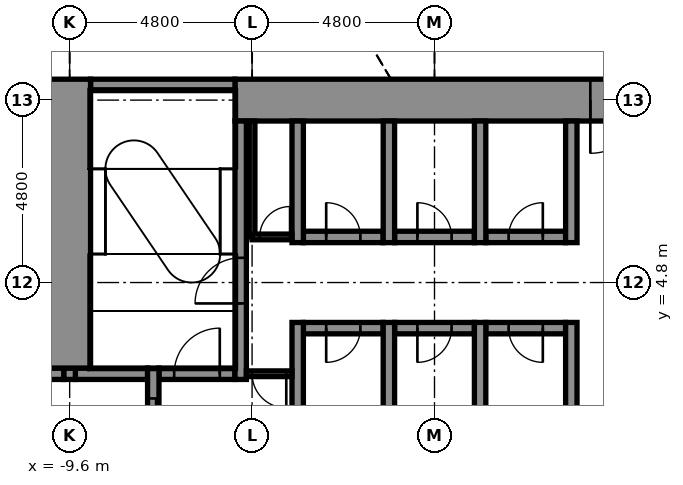
"""IFC4 building model, lengths in metres.
Left out: names, types, materials, properties, quantities, classifications, styles, units other than length and angle.
Written with IfcOpenShell. Run it as: python <this file> out.ifc"""

import sys

from ifc_helpers import new_model, si_unit, direction, frame, frame_2d, origin, place, context, subcontext, project, spatial, rectangle, extrude, element, fill, save


model = new_model("IFC4")
c1 = context("Model", 3, precision=1e-05, world=origin(), true_north=direction((0.0, 1.0)))
c2 = subcontext(c1, "Body", "Model", "MODEL_VIEW")
j1 = project(units=[si_unit("LENGTHUNIT", "METRE"), si_unit("PLANEANGLEUNIT", "RADIAN")], contexts=[c1])
p1 = place(None, origin())
s1 = spatial("IfcSite", under=j1, at=p1, CompositionType="ELEMENT")
p2 = place(p1, origin())
s2 = spatial("IfcBuilding", under=s1, at=p2, CompositionType="ELEMENT")
p3 = place(p2, frame((0.0, 0.0, 71.9)))
s3 = spatial("IfcBuildingStorey", under=s2, at=p3, CompositionType="ELEMENT", Elevation=71.9)
p4 = place(p3, frame((-10.85, 2.4, -0.3), z_axis=(0.0, 0.0, 1.0), x_axis=(1.0, 0.0, 0.0)))
e1 = element("IfcWall", 1, at=p4, inside=s3, PredefinedType="STANDARD", context=c2, shape_type="SweptSolid", body=[
    extrude(rectangle(XDim=1.1, YDim=0.3, at=frame_2d((0.55, 0.0))), origin(), (0.0, 0.0, 1.0), 6.1),
])
p5 = place(p3, frame((-9.45, 2.4, -0.3), z_axis=(0.0, 0.0, 1.0), x_axis=(1.0, 0.0, 0.0)))
e2 = element("IfcWall", 2, at=p5, inside=s3, PredefinedType="STANDARD", context=c2, shape_type="SweptSolid", body=[
    extrude(rectangle(XDim=1.9, YDim=0.3, at=frame_2d((0.95, 0.0))), origin(), (0.0, 0.0, 1.0), 6.1),
])
p6 = place(p3, frame((-7.25, 2.4, -0.3), z_axis=(0.0, 0.0, 1.0), x_axis=(1.0, 0.0, 0.0)))
e3 = element("IfcWall", 3, at=p6, inside=s3, PredefinedType="STANDARD", context=c2, shape_type="SweptSolid", body=[
    extrude(rectangle(XDim=2.0, YDim=0.3, at=frame_2d((1.0, 0.0))), origin(), (0.0, 0.0, 1.0), 6.1),
])
p7 = place(p6, frame((0.4, 0.0, 0.3)))
e4 = element("IfcOpeningElement", 4, at=p7, cuts=e3, PredefinedType="OPENING", context=c2, shape_type="SweptSolid", body=[
    extrude(rectangle(XDim=1.2, YDim=2.1, at=frame_2d((0.6, 1.05))), frame((0.0, 0.16, 0.0), z_axis=(0.0, -1.0, 0.0), x_axis=(1.0, 0.0, 0.0)), (0.0, 0.0, 1.0), 0.32),
])
p8 = place(p3, frame((-3.45, 3.6, -0.3), z_axis=(0.0, 0.0, 1.0), x_axis=(1.0, 0.0, 0.0)))
e5 = element("IfcWall", 5, at=p8, inside=s3, PredefinedType="STANDARD", context=c2, shape_type="SweptSolid", body=[
    extrude(rectangle(XDim=2.1, YDim=0.3, at=frame_2d((1.05, 0.0))), origin(), (0.0, 0.0, 1.0), 6.1),
])
p9 = place(p8, frame((0.6, 0.0, 0.3)))
e6 = element("IfcOpeningElement", 6, at=p9, cuts=e5, PredefinedType="OPENING", context=c2, shape_type="SweptSolid", body=[
    extrude(rectangle(XDim=0.9, YDim=2.1, at=frame_2d((0.45, 1.05))), frame((0.0, 0.16, 0.0), z_axis=(0.0, -1.0, 0.0), x_axis=(1.0, 0.0, 0.0)), (0.0, 0.0, 1.0), 0.32),
])
p10 = place(p3, frame((-1.05, 3.6, -0.3), z_axis=(0.0, 0.0, 1.0), x_axis=(1.0, 0.0, 0.0)))
e7 = element("IfcWall", 7, at=p10, inside=s3, PredefinedType="STANDARD", context=c2, shape_type="SweptSolid", body=[
    extrude(rectangle(XDim=2.1, YDim=0.3, at=frame_2d((1.05, 0.0))), origin(), (0.0, 0.0, 1.0), 6.1),
])
p11 = place(p10, frame((0.6, 0.0, 0.3)))
e8 = element("IfcOpeningElement", 8, at=p11, cuts=e7, PredefinedType="OPENING", context=c2, shape_type="SweptSolid", body=[
    extrude(rectangle(XDim=0.9, YDim=2.1, at=frame_2d((0.45, 1.05))), frame((0.0, 0.16, 0.0), z_axis=(0.0, -1.0, 0.0), x_axis=(1.0, 0.0, 0.0)), (0.0, 0.0, 1.0), 0.32),
])
p12 = place(p3, frame((1.35, 3.6, -0.3), z_axis=(0.0, 0.0, 1.0), x_axis=(1.0, 0.0, 0.0)))
e9 = element("IfcWall", 9, at=p12, inside=s3, PredefinedType="STANDARD", context=c2, shape_type="SweptSolid", body=[
    extrude(rectangle(XDim=2.1, YDim=0.3, at=frame_2d((1.05, 0.0))), origin(), (0.0, 0.0, 1.0), 6.1),
])
p13 = place(p12, frame((0.6, 0.0, 0.3)))
e10 = element("IfcOpeningElement", 10, at=p13, cuts=e9, PredefinedType="OPENING", context=c2, shape_type="SweptSolid", body=[
    extrude(rectangle(XDim=0.9, YDim=2.1, at=frame_2d((0.45, 1.05))), frame((0.0, 0.16, 0.0), z_axis=(0.0, -1.0, 0.0), x_axis=(1.0, 0.0, 0.0)), (0.0, 0.0, 1.0), 0.32),
])
p14 = place(p3, frame((-3.45, 6.0, -0.3), z_axis=(0.0, 0.0, 1.0), x_axis=(1.0, 0.0, 0.0)))
e11 = element("IfcWall", 11, at=p14, inside=s3, PredefinedType="STANDARD", context=c2, shape_type="SweptSolid", body=[
    extrude(rectangle(XDim=2.1, YDim=0.3, at=frame_2d((1.05, 0.0))), origin(), (0.0, 0.0, 1.0), 6.1),
])
p15 = place(p14, frame((0.6, 0.0, 0.3)))
e12 = element("IfcOpeningElement", 12, at=p15, cuts=e11, PredefinedType="OPENING", context=c2, shape_type="SweptSolid", body=[
    extrude(rectangle(XDim=0.9, YDim=2.1, at=frame_2d((0.45, 1.05))), frame((0.0, 0.16, 0.0), z_axis=(0.0, -1.0, 0.0), x_axis=(1.0, 0.0, 0.0)), (0.0, 0.0, 1.0), 0.32),
])
p16 = place(p3, frame((-1.05, 6.0, -0.3), z_axis=(0.0, 0.0, 1.0), x_axis=(1.0, 0.0, 0.0)))
e13 = element("IfcWall", 13, at=p16, inside=s3, PredefinedType="STANDARD", context=c2, shape_type="SweptSolid", body=[
    extrude(rectangle(XDim=2.1, YDim=0.3, at=frame_2d((1.05, 0.0))), origin(), (0.0, 0.0, 1.0), 6.1),
])
p17 = place(p16, frame((0.6, 0.0, 0.3)))
e14 = element("IfcOpeningElement", 14, at=p17, cuts=e13, PredefinedType="OPENING", context=c2, shape_type="SweptSolid", body=[
    extrude(rectangle(XDim=0.9, YDim=2.1, at=frame_2d((0.45, 1.05))), frame((0.0, 0.16, 0.0), z_axis=(0.0, -1.0, 0.0), x_axis=(1.0, 0.0, 0.0)), (0.0, 0.0, 1.0), 0.32),
])
p18 = place(p3, frame((1.35, 6.0, -0.3), z_axis=(0.0, 0.0, 1.0), x_axis=(1.0, 0.0, 0.0)))
e15 = element("IfcWall", 15, at=p18, inside=s3, PredefinedType="STANDARD", context=c2, shape_type="SweptSolid", body=[
    extrude(rectangle(XDim=2.1, YDim=0.3, at=frame_2d((1.05, 0.0))), origin(), (0.0, 0.0, 1.0), 6.1),
])
p19 = place(p18, frame((0.6, 0.0, 0.3)))
e16 = element("IfcOpeningElement", 16, at=p19, cuts=e15, PredefinedType="OPENING", context=c2, shape_type="SweptSolid", body=[
    extrude(rectangle(XDim=0.9, YDim=2.1, at=frame_2d((0.45, 1.05))), frame((0.0, 0.16, 0.0), z_axis=(0.0, -1.0, 0.0), x_axis=(1.0, 0.0, 0.0)), (0.0, 0.0, 1.0), 0.32),
])
p20 = place(p3, frame((-5.25, 9.6, -0.3), z_axis=(0.0, 0.0, 1.0), x_axis=(1.0, 0.0, 0.0)))
e17 = element("IfcWall", 17, at=p20, inside=s3, PredefinedType="SHEAR", context=c2, shape_type="SweptSolid", body=[
    extrude(rectangle(XDim=14.3, YDim=1.1, at=frame_2d((7.15, 0.0))), origin(), (0.0, 0.0, 1.0), 6.1),
])
p21 = place(p20, frame((9.35, 0.0, 0.3)))
e18 = element("IfcOpeningElement", 18, at=p21, cuts=e17, PredefinedType="OPENING", context=c2, shape_type="SweptSolid", body=[
    extrude(rectangle(XDim=1.4, YDim=2.1, at=frame_2d((0.7, 1.05))), frame((0.0, 0.56, 0.0), z_axis=(0.0, -1.0, 0.0), x_axis=(1.0, 0.0, 0.0)), (0.0, 0.0, 1.0), 1.12),
])
p22 = place(p3, frame((-9.05, 10.0, -0.3), z_axis=(0.0, 0.0, 1.0), x_axis=(1.0, 0.0, 0.0)))
e19 = element("IfcWall", 19, at=p22, inside=s3, PredefinedType="STANDARD", context=c2, shape_type="SweptSolid", body=[
    extrude(rectangle(XDim=3.8, YDim=0.3, at=frame_2d((1.9, 0.0))), origin(), (0.0, 0.0, 1.0), 6.1),
])
p23 = place(p3, frame((-9.6, 2.25, -0.3), z_axis=(0.0, 0.0, 1.0), x_axis=(0.0, 1.0, 0.0)))
e20 = element("IfcWall", 20, at=p23, inside=s3, PredefinedType="STANDARD", context=c2, shape_type="SweptSolid", body=[
    extrude(rectangle(XDim=0.3, YDim=0.3, at=frame_2d((0.15, 0.0))), origin(), (0.0, 0.0, 1.0), 6.1),
])
p24 = place(p3, frame((-9.6, 2.55, -0.3), z_axis=(0.0, 0.0, 1.0), x_axis=(0.0, 1.0, 0.0)))
e21 = element("IfcWall", 21, at=p24, inside=s3, PredefinedType="SHEAR", context=c2, shape_type="SweptSolid", body=[
    extrude(rectangle(XDim=7.6, YDim=1.1, at=frame_2d((3.8, 0.0))), origin(), (0.0, 0.0, 1.0), 6.1),
])
p25 = place(p3, frame((-7.4, -2.55, -0.3), z_axis=(0.0, 0.0, 1.0), x_axis=(0.0, 1.0, 0.0)))
e22 = element("IfcWall", 22, at=p25, inside=s3, PredefinedType="STANDARD", context=c2, shape_type="SweptSolid", body=[
    extrude(rectangle(XDim=5.1, YDim=0.3, at=frame_2d((2.55, 0.0))), origin(), (0.0, 0.0, 1.0), 6.1),
])
p26 = place(p25, frame((0.8, 0.0, 0.3)))
e23 = element("IfcOpeningElement", 23, at=p26, cuts=e22, PredefinedType="OPENING", context=c2, shape_type="SweptSolid", body=[
    extrude(rectangle(XDim=1.1, YDim=2.1, at=frame_2d((0.55, 1.05))), frame((0.0, 0.16, 0.0), z_axis=(0.0, -1.0, 0.0), x_axis=(1.0, 0.0, 0.0)), (0.0, 0.0, 1.0), 0.32),
])
p27 = place(p25, frame((3.2, 0.0, 0.3)))
e24 = element("IfcOpeningElement", 24, at=p27, cuts=e22, PredefinedType="OPENING", context=c2, shape_type="SweptSolid", body=[
    extrude(rectangle(XDim=1.1, YDim=2.1, at=frame_2d((0.55, 1.05))), frame((0.0, 0.16, 0.0), z_axis=(0.0, -1.0, 0.0), x_axis=(1.0, 0.0, 0.0)), (0.0, 0.0, 1.0), 0.32),
])
p28 = place(p3, frame((-5.1, 2.25, -0.3), z_axis=(0.0, 0.0, 1.0), x_axis=(0.0, 1.0, 0.0)))
e25 = element("IfcWall", 25, at=p28, inside=s3, PredefinedType="STANDARD", context=c2, shape_type="SweptSolid", body=[
    extrude(rectangle(XDim=6.8, YDim=0.3, at=frame_2d((3.4, 0.0))), origin(), (0.0, 0.0, 1.0), 6.1),
])
p29 = place(p28, frame((2.0, 0.0, 0.3)))
e26 = element("IfcOpeningElement", 26, at=p29, cuts=e25, PredefinedType="OPENING", context=c2, shape_type="SweptSolid", body=[
    extrude(rectangle(XDim=1.2, YDim=2.1, at=frame_2d((0.6, 1.05))), frame((0.0, 0.16, 0.0), z_axis=(0.0, -1.0, 0.0), x_axis=(1.0, 0.0, 0.0)), (0.0, 0.0, 1.0), 0.32),
])
p30 = place(p3, frame((-3.6, -3.75, -0.3), z_axis=(0.0, 0.0, 1.0), x_axis=(0.0, 1.0, 0.0)))
e27 = element("IfcWall", 27, at=p30, inside=s3, PredefinedType="STANDARD", context=c2, shape_type="SweptSolid", body=[
    extrude(rectangle(XDim=7.5, YDim=0.3, at=frame_2d((3.75, 0.0))), origin(), (0.0, 0.0, 1.0), 6.1),
])
p31 = place(p3, frame((-3.6, 5.85, -0.3), z_axis=(0.0, 0.0, 1.0), x_axis=(0.0, 1.0, 0.0)))
e28 = element("IfcWall", 28, at=p31, inside=s3, PredefinedType="STANDARD", context=c2, shape_type="SweptSolid", body=[
    extrude(rectangle(XDim=3.2, YDim=0.3, at=frame_2d((1.6, 0.0))), origin(), (0.0, 0.0, 1.0), 6.1),
])
p32 = place(p3, frame((-1.2, -3.75, -0.3), z_axis=(0.0, 0.0, 1.0), x_axis=(0.0, 1.0, 0.0)))
e29 = element("IfcWall", 29, at=p32, inside=s3, PredefinedType="STANDARD", context=c2, shape_type="SweptSolid", body=[
    extrude(rectangle(XDim=7.5, YDim=0.3, at=frame_2d((3.75, 0.0))), origin(), (0.0, 0.0, 1.0), 6.1),
])
p33 = place(p3, frame((-1.2, 5.85, -0.3), z_axis=(0.0, 0.0, 1.0), x_axis=(0.0, 1.0, 0.0)))
e30 = element("IfcWall", 30, at=p33, inside=s3, PredefinedType="STANDARD", context=c2, shape_type="SweptSolid", body=[
    extrude(rectangle(XDim=3.2, YDim=0.3, at=frame_2d((1.6, 0.0))), origin(), (0.0, 0.0, 1.0), 6.1),
])
p34 = place(p3, frame((1.2, -3.75, -0.3), z_axis=(0.0, 0.0, 1.0), x_axis=(0.0, 1.0, 0.0)))
e31 = element("IfcWall", 31, at=p34, inside=s3, PredefinedType="STANDARD", context=c2, shape_type="SweptSolid", body=[
    extrude(rectangle(XDim=7.5, YDim=0.3, at=frame_2d((3.75, 0.0))), origin(), (0.0, 0.0, 1.0), 6.1),
])
p35 = place(p3, frame((1.2, 5.85, -0.3), z_axis=(0.0, 0.0, 1.0), x_axis=(0.0, 1.0, 0.0)))
e32 = element("IfcWall", 32, at=p35, inside=s3, PredefinedType="STANDARD", context=c2, shape_type="SweptSolid", body=[
    extrude(rectangle(XDim=3.2, YDim=0.3, at=frame_2d((1.6, 0.0))), origin(), (0.0, 0.0, 1.0), 6.1),
])
p36 = place(p3, frame((3.6, -3.75, -0.3), z_axis=(0.0, 0.0, 1.0), x_axis=(0.0, 1.0, 0.0)))
e33 = element("IfcWall", 33, at=p36, inside=s3, PredefinedType="STANDARD", context=c2, shape_type="SweptSolid", body=[
    extrude(rectangle(XDim=7.5, YDim=0.3, at=frame_2d((3.75, 0.0))), origin(), (0.0, 0.0, 1.0), 6.1),
])
p37 = place(p3, frame((3.6, 5.85, -0.3), z_axis=(0.0, 0.0, 1.0), x_axis=(0.0, 1.0, 0.0)))
e34 = element("IfcWall", 34, at=p37, inside=s3, PredefinedType="STANDARD", context=c2, shape_type="SweptSolid", body=[
    extrude(rectangle(XDim=3.2, YDim=0.3, at=frame_2d((1.6, 0.0))), origin(), (0.0, 0.0, 1.0), 6.1),
])
p38 = place(p3, frame((-4.8, 6.0, 0.0), z_axis=(0.0, 0.0, 1.0), x_axis=(0.0, 1.0, 0.0)))
e35 = element("IfcWall", 35, at=p38, inside=s3, PredefinedType="PARTITIONING", context=c2, shape_type="SweptSolid", body=[
    extrude(rectangle(XDim=3.05, YDim=0.15, at=frame_2d((1.525, 0.0))), origin(), (0.0, 0.0, 1.0), 5.8),
])
p39 = place(p3, frame((-4.8, 6.0, 0.0), z_axis=(0.0, 0.0, 1.0), x_axis=(1.0, 0.0, 0.0)))
e36 = element("IfcWall", 36, at=p39, inside=s3, PredefinedType="PARTITIONING", context=c2, shape_type="SweptSolid", body=[
    extrude(rectangle(XDim=1.05, YDim=0.15, at=frame_2d((0.525, 0.0))), origin(), (0.0, 0.0, 1.0), 5.8),
])
p40 = place(p39, frame((0.2, 0.0, 0.0)))
e37 = element("IfcOpeningElement", 37, at=p40, cuts=e36, PredefinedType="OPENING", context=c2, shape_type="SweptSolid", body=[
    extrude(rectangle(XDim=0.8, YDim=2.1, at=frame_2d((0.4, 1.05))), frame((0.0, 0.085, 0.0), z_axis=(0.0, -1.0, 0.0), x_axis=(1.0, 0.0, 0.0)), (0.0, 0.0, 1.0), 0.17),
])
p41 = place(p3, frame((-4.95, 2.4, 0.0), z_axis=(0.0, 0.0, 1.0), x_axis=(1.0, 0.0, 0.0)))
e38 = element("IfcWall", 38, at=p41, inside=s3, PredefinedType="PARTITIONING", context=c2, shape_type="SweptSolid", body=[
    extrude(rectangle(XDim=1.2, YDim=0.15, at=frame_2d((0.6, 0.0))), origin(), (0.0, 0.0, 1.0), 5.8),
])
p42 = place(p41, frame((0.15, 0.0, 0.0)))
e39 = element("IfcOpeningElement", 39, at=p42, cuts=e38, PredefinedType="OPENING", context=c2, shape_type="SweptSolid", body=[
    extrude(rectangle(XDim=0.9, YDim=2.1, at=frame_2d((0.45, 1.05))), frame((0.0, 0.085, 0.0), z_axis=(0.0, -1.0, 0.0), x_axis=(1.0, 0.0, 0.0)), (0.0, 0.0, 1.0), 0.17),
])
p43 = place(p40, origin())
e40 = element("IfcDoor", 40, at=p43, inside=s3, OperationType="SINGLE_SWING_RIGHT", PredefinedType="DOOR", context=c2, shape_type="SweptSolid", body=[
    extrude(rectangle(XDim=0.8, YDim=2.1, at=frame_2d((0.4, 1.05))), frame((0.0, 0.025, 0.0), z_axis=(0.0, -1.0, 0.0), x_axis=(1.0, 0.0, 0.0)), (0.0, 0.0, 1.0), 0.05),
])
fill(e37, e40)
p44 = place(p27, origin())
e41 = element("IfcDoor", 41, at=p44, inside=s3, OperationType="DOUBLE_DOOR_SLIDING", PredefinedType="DOOR", context=c2, shape_type="SweptSolid", body=[
    extrude(rectangle(XDim=1.1, YDim=2.1, at=frame_2d((0.55, 1.05))), frame((0.0, 0.025, 0.0), z_axis=(0.0, -1.0, 0.0), x_axis=(1.0, 0.0, 0.0)), (0.0, 0.0, 1.0), 0.05),
])
fill(e24, e41)
p45 = place(p29, origin())
e42 = element("IfcDoor", 42, at=p45, inside=s3, OperationType="SINGLE_SWING_LEFT", PredefinedType="DOOR", context=c2, shape_type="SweptSolid", body=[
    extrude(rectangle(XDim=1.2, YDim=2.1, at=frame_2d((0.6, 1.05))), frame((0.0, 0.025, 0.0), z_axis=(0.0, -1.0, 0.0), x_axis=(1.0, 0.0, 0.0)), (0.0, 0.0, 1.0), 0.05),
])
fill(e26, e42)
p46 = place(p15, origin())
e43 = element("IfcDoor", 43, at=p46, inside=s3, OperationType="SINGLE_SWING_LEFT", PredefinedType="DOOR", context=c2, shape_type="SweptSolid", body=[
    extrude(rectangle(XDim=0.9, YDim=2.1, at=frame_2d((0.45, 1.05))), frame((0.0, 0.025, 0.0), z_axis=(0.0, -1.0, 0.0), x_axis=(1.0, 0.0, 0.0)), (0.0, 0.0, 1.0), 0.05),
])
fill(e12, e43)
p47 = place(p17, origin())
e44 = element("IfcDoor", 44, at=p47, inside=s3, OperationType="SINGLE_SWING_LEFT", PredefinedType="DOOR", context=c2, shape_type="SweptSolid", body=[
    extrude(rectangle(XDim=0.9, YDim=2.1, at=frame_2d((0.45, 1.05))), frame((0.0, 0.025, 0.0), z_axis=(0.0, -1.0, 0.0), x_axis=(1.0, 0.0, 0.0)), (0.0, 0.0, 1.0), 0.05),
])
fill(e14, e44)
p48 = place(p19, origin())
e45 = element("IfcDoor", 45, at=p48, inside=s3, OperationType="SINGLE_SWING_RIGHT", PredefinedType="DOOR", context=c2, shape_type="SweptSolid", body=[
    extrude(rectangle(XDim=0.9, YDim=2.1, at=frame_2d((0.45, 1.05))), frame((0.0, 0.025, 0.0), z_axis=(0.0, -1.0, 0.0), x_axis=(1.0, 0.0, 0.0)), (0.0, 0.0, 1.0), 0.05),
])
fill(e16, e45)
p49 = place(p9, frame((0.9, 0.0, 0.0), z_axis=(0.0, 0.0, 1.0), x_axis=(-1.0, 0.0, 0.0)))
e46 = element("IfcDoor", 46, at=p49, inside=s3, OperationType="SINGLE_SWING_LEFT", PredefinedType="DOOR", context=c2, shape_type="SweptSolid", body=[
    extrude(rectangle(XDim=0.9, YDim=2.1, at=frame_2d((0.45, 1.05))), frame((0.0, 0.025, 0.0), z_axis=(0.0, -1.0, 0.0), x_axis=(1.0, 0.0, 0.0)), (0.0, 0.0, 1.0), 0.05),
])
fill(e6, e46)
p50 = place(p11, frame((0.9, 0.0, 0.0), z_axis=(0.0, 0.0, 1.0), x_axis=(-1.0, 0.0, 0.0)))
e47 = element("IfcDoor", 47, at=p50, inside=s3, OperationType="SINGLE_SWING_LEFT", PredefinedType="DOOR", context=c2, shape_type="SweptSolid", body=[
    extrude(rectangle(XDim=0.9, YDim=2.1, at=frame_2d((0.45, 1.05))), frame((0.0, 0.025, 0.0), z_axis=(0.0, -1.0, 0.0), x_axis=(1.0, 0.0, 0.0)), (0.0, 0.0, 1.0), 0.05),
])
fill(e8, e47)
p51 = place(p13, frame((0.9, 0.0, 0.0), z_axis=(0.0, 0.0, 1.0), x_axis=(-1.0, 0.0, 0.0)))
e48 = element("IfcDoor", 48, at=p51, inside=s3, OperationType="SINGLE_SWING_RIGHT", PredefinedType="DOOR", context=c2, shape_type="SweptSolid", body=[
    extrude(rectangle(XDim=0.9, YDim=2.1, at=frame_2d((0.45, 1.05))), frame((0.0, 0.025, 0.0), z_axis=(0.0, -1.0, 0.0), x_axis=(1.0, 0.0, 0.0)), (0.0, 0.0, 1.0), 0.05),
])
fill(e10, e48)
p52 = place(p21, frame((1.4, 0.0, 0.0), z_axis=(0.0, 0.0, 1.0), x_axis=(-1.0, 0.0, 0.0)))
e49 = element("IfcDoor", 49, at=p52, inside=s3, OperationType="SINGLE_SWING_LEFT", PredefinedType="DOOR", context=c2, shape_type="SweptSolid", body=[
    extrude(rectangle(XDim=1.4, YDim=2.1, at=frame_2d((0.7, 1.05))), frame((0.0, 0.025, 0.0), z_axis=(0.0, -1.0, 0.0), x_axis=(1.0, 0.0, 0.0)), (0.0, 0.0, 1.0), 0.05),
])
fill(e18, e49)
p53 = place(p42, frame((0.9, 0.0, 0.0), z_axis=(0.0, 0.0, 1.0), x_axis=(-1.0, 0.0, 0.0)))
e50 = element("IfcDoor", 50, at=p53, inside=s3, OperationType="SINGLE_SWING_RIGHT", PredefinedType="DOOR", context=c2, shape_type="SweptSolid", body=[
    extrude(rectangle(XDim=0.9, YDim=2.1, at=frame_2d((0.45, 1.05))), frame((0.0, 0.025, 0.0), z_axis=(0.0, -1.0, 0.0), x_axis=(1.0, 0.0, 0.0)), (0.0, 0.0, 1.0), 0.05),
])
fill(e39, e50)
p54 = place(p7, origin())
e51 = element("IfcDoor", 51, at=p54, inside=s3, OperationType="SINGLE_SWING_RIGHT", PredefinedType="DOOR", context=c2, shape_type="SweptSolid", body=[
    extrude(rectangle(XDim=1.2, YDim=2.1, at=frame_2d((0.6, 1.05))), frame((0.0, 0.025, 0.0), z_axis=(0.0, -1.0, 0.0), x_axis=(1.0, 0.0, 0.0)), (0.0, 0.0, 1.0), 0.05),
])
fill(e4, e51)
save(model, sys.argv[1])
